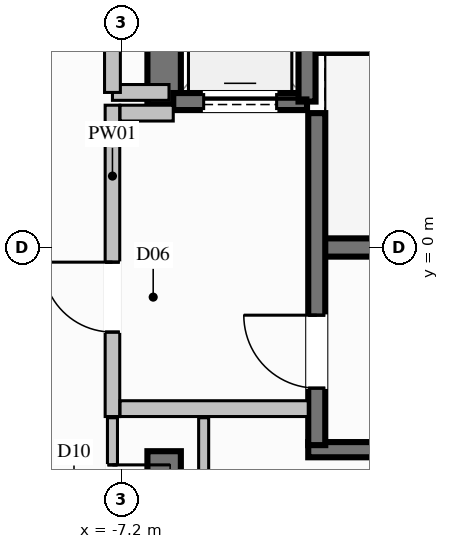
"""IFC4 building model, lengths in metres.
Left out: names, types, materials, properties, quantities, classifications, styles, units other than length and angle.
Written with IfcOpenShell. Run it as: python <this file> out.ifc"""

import sys

from ifc_helpers import new_model, si_unit, direction, frame, frame_2d, origin, place, context, subcontext, project, spatial, rectangle, extrude, element, fill, save


model = new_model("IFC4")
c1 = context("Model", 3, precision=1e-05, world=origin(), true_north=direction((0.0, 1.0)))
c2 = subcontext(c1, "Body", "Model", "MODEL_VIEW")
j1 = project(units=[si_unit("LENGTHUNIT", "METRE"), si_unit("PLANEANGLEUNIT", "RADIAN")], contexts=[c1])
p1 = place(None, origin())
s1 = spatial("IfcSite", under=j1, at=p1, CompositionType="ELEMENT")
p2 = place(p1, origin())
s2 = spatial("IfcBuilding", under=s1, at=p2, CompositionType="ELEMENT")
p3 = place(p2, frame((0.0, 0.0, 176.8)))
s3 = spatial("IfcBuildingStorey", under=s2, at=p3, CompositionType="ELEMENT", Elevation=176.8)
p4 = place(p3, frame((-3.99, 0.0, 0.0), z_axis=(0.0, 0.0, 1.0), x_axis=(1.0, 0.0, 0.0)))
e1 = element("IfcWall", 1, at=p4, inside=s3, PredefinedType="SHEAR", context=c2, shape_type="SweptSolid", body=[
    extrude(rectangle(XDim=7.98, YDim=0.3, at=frame_2d((3.99, 0.0))), origin(), (0.0, 0.0, 1.0), 3.6),
])
for number, where, z_axis, x_axis in (
    (2, (-4.13, -3.325, 0.0), (0.0, 0.0, 1.0), (1.0, 0.0, 0.0)),
    (3, (-4.13, 3.325, 0.0), (0.0, 0.0, 1.0), (1.0, 0.0, 0.0)),
):
    element("IfcWall", number, at=place(p3, frame(where, z_axis=z_axis, x_axis=x_axis)), inside=s3, PredefinedType="SOLIDWALL", context=c2, shape_type="SweptSolid", body=[
        extrude(rectangle(XDim=8.26, YDim=0.25, at=frame_2d((4.13, 0.0))), origin(), (0.0, 0.0, 1.0), 3.6),
    ])
p5 = place(p3, frame((-6.5, 2.35, 0.0), z_axis=(0.0, 0.0, 1.0), x_axis=(0.0, 1.0, 0.0)))
e4 = element("IfcWall", 4, at=p5, inside=s3, PredefinedType="SHEAR", context=c2, shape_type="SweptSolid", body=[
    extrude(rectangle(XDim=4.025, YDim=0.55, at=frame_2d((2.012, 0.0))), origin(), (0.0, 0.0, 1.0), 3.6),
])
p6 = place(p3, frame((-6.5, -6.375, 0.0), z_axis=(0.0, 0.0, 1.0), x_axis=(0.0, 1.0, 0.0)))
e5 = element("IfcWall", 5, at=p6, inside=s3, PredefinedType="SHEAR", context=c2, shape_type="SweptSolid", body=[
    extrude(rectangle(XDim=3.025, YDim=0.55, at=frame_2d((1.512, 0.0))), origin(), (0.0, 0.0, 1.0), 3.6),
])
p7 = place(p3, frame((-6.35, 2.4, 0.0), z_axis=(0.0, 0.0, 1.0), x_axis=(1.0, 0.0, 0.0)))
e6 = element("IfcWall", 6, at=p7, inside=s3, PredefinedType="SOLIDWALL", context=c2, shape_type="SweptSolid", body=[
    extrude(rectangle(XDim=2.2, YDim=0.28, at=frame_2d((1.1, 0.0))), origin(), (0.0, 0.0, 1.0), 3.36),
])
p8 = place(p7, frame((0.5, 0.0, 0.0)))
e7 = element("IfcOpeningElement", 7, at=p8, cuts=e6, PredefinedType="OPENING", context=c2, shape_type="SweptSolid", body=[
    extrude(rectangle(XDim=1.2, YDim=2.2, at=frame_2d((0.6, 1.1))), frame((0.0, 0.15, 0.0), z_axis=(0.0, -1.0, 0.0), x_axis=(1.0, 0.0, 0.0)), (0.0, 0.0, 1.0), 0.3),
])
p9 = place(p3, frame((-4.15, 2.4, 0.0), z_axis=(0.0, 0.0, 1.0), x_axis=(0.0, 1.0, 0.0)))
e8 = element("IfcWall", 8, at=p9, inside=s3, PredefinedType="SOLIDWALL", context=c2, shape_type="SweptSolid", body=[
    extrude(rectangle(XDim=2.7, YDim=0.28, at=frame_2d((1.35, 0.0))), origin(), (0.0, 0.0, 1.0), 3.36),
])
p10 = place(p3, frame((-3.99, -3.25, 0.0), z_axis=(0.0, 0.0, 1.0), x_axis=(0.0, 1.0, 0.0)))
e9 = element("IfcWall", 9, at=p10, inside=s3, PredefinedType="SOLIDWALL", context=c2, shape_type="SweptSolid", body=[
    extrude(rectangle(XDim=5.46, YDim=0.28, at=frame_2d((2.73, 0.0))), origin(), (0.0, 0.0, 1.0), 3.36),
])
p11 = place(p10, frame((0.937, 0.0, 0.0)))
e10 = element("IfcOpeningElement", 10, at=p11, cuts=e9, PredefinedType="OPENING", context=c2, shape_type="SweptSolid", body=[
    extrude(rectangle(XDim=1.2, YDim=2.2, at=frame_2d((0.6, 1.1))), frame((0.0, 0.15, 0.0), z_axis=(0.0, -1.0, 0.0), x_axis=(1.0, 0.0, 0.0)), (0.0, 0.0, 1.0), 0.3),
])
p12 = place(p3, frame((-7.35, -2.78, 0.0), z_axis=(0.0, 0.0, 1.0), x_axis=(0.0, 1.0, 0.0)))
e11 = element("IfcWall", 11, at=p12, inside=s3, PredefinedType="PARTITIONING", context=c2, shape_type="SweptSolid", body=[
    extrude(rectangle(XDim=5.12, YDim=0.24, at=frame_2d((2.56, 0.0))), origin(), (0.0, 0.0, 1.0), 2.445),
])
p13 = place(p12, frame((1.389, 0.0, 0.0)))
e12 = element("IfcOpeningElement", 12, at=p13, cuts=e11, PredefinedType="OPENING", context=c2, shape_type="SweptSolid", body=[
    extrude(rectangle(XDim=1.15, YDim=2.2, at=frame_2d((0.575, 1.1))), frame((0.0, 0.13, 0.0), z_axis=(0.0, -1.0, 0.0), x_axis=(1.0, 0.0, 0.0)), (0.0, 0.0, 1.0), 0.26),
])
p14 = place(p3, frame((-7.225, -2.65, 0.0), z_axis=(0.0, 0.0, 1.0), x_axis=(1.0, 0.0, 0.0)))
e13 = element("IfcWall", 13, at=p14, inside=s3, PredefinedType="PARTITIONING", context=c2, shape_type="SweptSolid", body=[
    extrude(rectangle(XDim=3.095, YDim=0.26, at=frame_2d((1.548, 0.0))), origin(), (0.0, 0.0, 1.0), 3.36),
])
p15 = place(p3, frame((-7.225, 2.21, 0.0), z_axis=(0.0, 0.0, 1.0), x_axis=(1.0, 0.0, 0.0)))
e14 = element("IfcWall", 14, at=p15, inside=s3, PredefinedType="PARTITIONING", context=c2, shape_type="SweptSolid", body=[
    extrude(rectangle(XDim=0.875, YDim=0.26, at=frame_2d((0.438, 0.0))), origin(), (0.0, 0.0, 1.0), 3.36),
])
p16 = place(p3, frame((-7.35, 2.55, 0.0), z_axis=(0.0, 0.0, 1.0), x_axis=(1.0, 0.0, 0.0)))
e15 = element("IfcWall", 15, at=p16, inside=s3, PredefinedType="PARTITIONING", context=c2, shape_type="SweptSolid", body=[
    extrude(rectangle(XDim=0.93, YDim=0.26, at=frame_2d((0.465, 0.0))), origin(), (0.0, 0.0, 1.0), 3.36),
])
p17 = place(p3, frame((-7.35, 2.55, 0.0), z_axis=(0.0, 0.0, 1.0), x_axis=(0.0, 1.0, 0.0)))
e16 = element("IfcWall", 16, at=p17, inside=s3, PredefinedType="PARTITIONING", context=c2, shape_type="SweptSolid", body=[
    extrude(rectangle(XDim=2.4, YDim=0.26, at=frame_2d((1.2, 0.0))), origin(), (0.0, 0.0, 1.0), 2.445),
])
p18 = place(p17, frame((0.775, 0.0, 0.0)))
e17 = element("IfcOpeningElement", 17, at=p18, cuts=e16, PredefinedType="OPENING", context=c2, shape_type="SweptSolid", body=[
    extrude(rectangle(XDim=0.85, YDim=2.05, at=frame_2d((0.425, 1.025))), frame((0.0, 0.14, 0.0), z_axis=(0.0, -1.0, 0.0), x_axis=(1.0, 0.0, 0.0)), (0.0, 0.0, 1.0), 0.28),
])
p19 = place(p3, frame((-5.85, -5.3, 0.0), z_axis=(0.0, 0.0, 1.0), x_axis=(0.0, 1.0, 0.0)))
e18 = element("IfcWall", 18, at=p19, inside=s3, PredefinedType="PARTITIONING", context=c2, shape_type="SweptSolid", body=[
    extrude(rectangle(XDim=2.5, YDim=0.165, at=frame_2d((1.25, 0.0))), origin(), (0.0, 0.0, 1.0), 2.445),
])
p20 = place(p3, frame((-7.35, -2.8, 0.0), z_axis=(0.0, 0.0, 1.0), x_axis=(0.0, -1.0, 0.0)))
e19 = element("IfcWall", 19, at=p20, inside=s3, PredefinedType="PARTITIONING", context=c2, shape_type="SweptSolid", body=[
    extrude(rectangle(XDim=2.5, YDim=0.165, at=frame_2d((1.25, 0.0))), origin(), (0.0, 0.0, 1.0), 3.36),
])
p21 = place(p20, frame((0.775, 0.0, 0.0)))
e20 = element("IfcOpeningElement", 20, at=p21, cuts=e19, PredefinedType="OPENING", context=c2, shape_type="SweptSolid", body=[
    extrude(rectangle(XDim=0.95, YDim=2.1, at=frame_2d((0.475, 1.05))), frame((0.0, 0.093, 0.0), z_axis=(0.0, -1.0, 0.0), x_axis=(1.0, 0.0, 0.0)), (0.0, 0.0, 1.0), 0.185),
])
p22 = place(p8, origin())
e21 = element("IfcDoor", 21, at=p22, inside=s3, OperationType="SLIDING_TO_LEFT", PredefinedType="DOOR", context=c2, shape_type="SweptSolid", body=[
    extrude(rectangle(XDim=1.2, YDim=2.2, at=frame_2d((0.6, 1.1))), frame((0.0, 0.025, 0.0), z_axis=(0.0, -1.0, 0.0), x_axis=(1.0, 0.0, 0.0)), (0.0, 0.0, 1.0), 0.05),
])
fill(e7, e21)
p23 = place(p11, origin())
e22 = element("IfcDoor", 22, at=p23, inside=s3, OperationType="SINGLE_SWING_RIGHT", PredefinedType="DOOR", context=c2, shape_type="SweptSolid", body=[
    extrude(rectangle(XDim=1.2, YDim=2.2, at=frame_2d((0.6, 1.1))), frame((0.0, 0.025, 0.0), z_axis=(0.0, -1.0, 0.0), x_axis=(1.0, 0.0, 0.0)), (0.0, 0.0, 1.0), 0.05),
])
fill(e10, e22)
p24 = place(p13, origin())
e23 = element("IfcDoor", 23, at=p24, inside=s3, OperationType="SINGLE_SWING_RIGHT", PredefinedType="DOOR", context=c2, shape_type="SweptSolid", body=[
    extrude(rectangle(XDim=1.15, YDim=2.2, at=frame_2d((0.575, 1.1))), frame((0.0, 0.025, 0.0), z_axis=(0.0, -1.0, 0.0), x_axis=(1.0, 0.0, 0.0)), (0.0, 0.0, 1.0), 0.05),
])
fill(e12, e23)
p25 = place(p21, origin())
e24 = element("IfcDoor", 24, at=p25, inside=s3, OperationType="SINGLE_SWING_LEFT", PredefinedType="DOOR", context=c2, shape_type="SweptSolid", body=[
    extrude(rectangle(XDim=0.95, YDim=2.1, at=frame_2d((0.475, 1.05))), frame((0.0, 0.025, 0.0), z_axis=(0.0, -1.0, 0.0), x_axis=(1.0, 0.0, 0.0)), (0.0, 0.0, 1.0), 0.05),
])
fill(e20, e24)
save(model, sys.argv[1])
